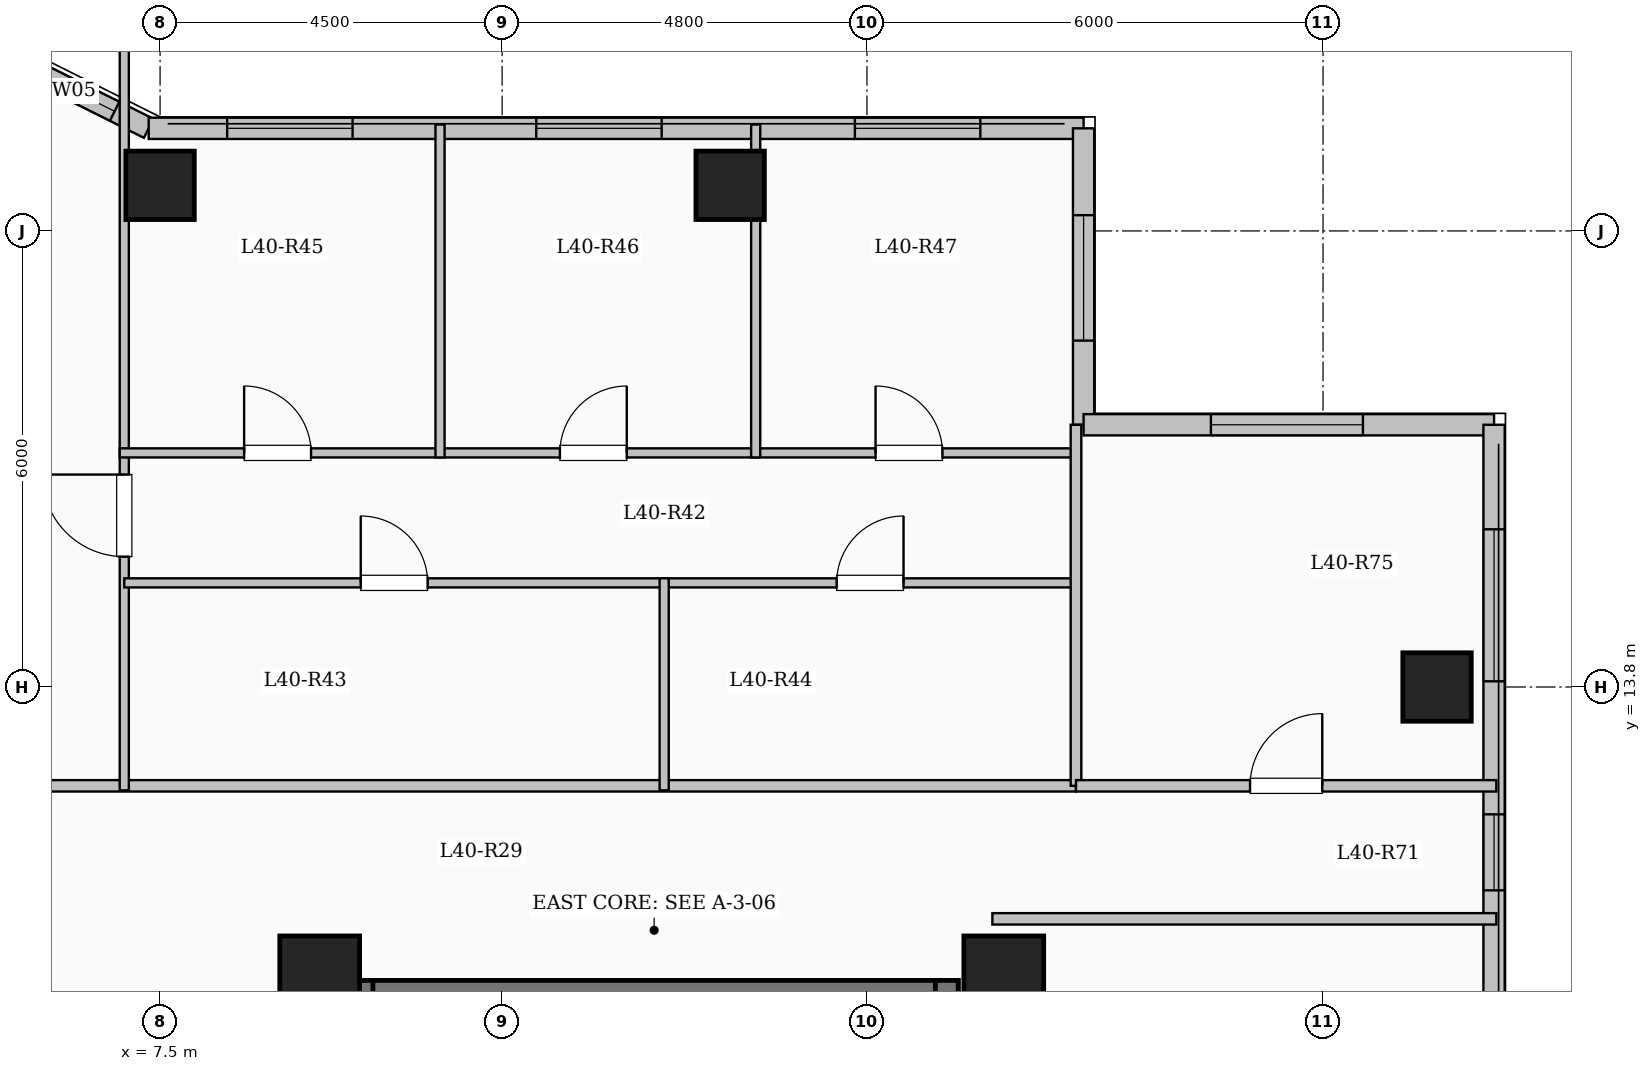
"""IFC4 building model, lengths in metres.
Left out: names, types, materials, properties, quantities, classifications, styles, units other than length and angle.
Written with IfcOpenShell. Run it as: python <this file> out.ifc"""

import sys

from ifc_helpers import new_model, si_unit, direction, frame, frame_2d, origin, origin_2d, place, context, subcontext, project, spatial, rectangle, extrude, element, fill, save


model = new_model("IFC4")
c1 = context("Model", 3, precision=1e-05, world=origin(), true_north=direction((0.0, 1.0)))
c2 = subcontext(c1, "Body", "Model", "MODEL_VIEW")
j1 = project(units=[si_unit("LENGTHUNIT", "METRE"), si_unit("PLANEANGLEUNIT", "RADIAN")], contexts=[c1])
p1 = place(None, origin())
s1 = spatial("IfcSite", under=j1, at=p1, CompositionType="ELEMENT")
p2 = place(p1, origin())
s2 = spatial("IfcBuilding", under=s1, at=p2, CompositionType="ELEMENT")
p3 = place(p2, frame((0.0, 0.0, 149.35)))
s3 = spatial("IfcBuildingStorey", under=s2, at=p3, CompositionType="ELEMENT", Elevation=149.35)
for number, where, z_axis, x_axis in (
    (1, (9.6, 10.0, 0.0), (0.0, 0.0, 1.0), (1.0, 0.0, 0.0)),
    (2, (18.6, 10.0, 0.0), (0.0, 0.0, 1.0), (1.0, 0.0, 0.0)),
):
    element("IfcColumn", number, at=place(p3, frame(where, z_axis=z_axis, x_axis=x_axis)), inside=s3, PredefinedType="COLUMN", context=c2, shape_type="SweptSolid", body=[
        extrude(rectangle(XDim=1.05, YDim=1.05, at=origin_2d()), origin(), (0.0, 0.0, 1.0), 3.35),
    ])
for number, where, z_axis, x_axis in (
    (3, (7.5, 20.4, 0.0), (0.0, 0.0, 1.0), (1.0, 0.0, 0.0)),
    (4, (15.0, 20.4, 0.0), (0.0, 0.0, 1.0), (1.0, 0.0, 0.0)),
    (5, (24.3, 13.8, 0.0), (0.0, 0.0, 1.0), (1.0, 0.0, 0.0)),
):
    element("IfcColumn", number, at=place(p3, frame(where, z_axis=z_axis, x_axis=x_axis)), inside=s3, PredefinedType="COLUMN", context=c2, shape_type="SweptSolid", body=[
        extrude(rectangle(XDim=0.9, YDim=0.9, at=origin_2d()), origin(), (0.0, 0.0, 1.0), 3.35),
    ])
p4 = place(p3, frame((4.35, 22.65, 0.0), z_axis=(0.0, 0.0, 1.0), x_axis=(0.894427191, -0.4472135955, 0.0)))
e6 = element("IfcWall", 6, at=p4, inside=s3, PredefinedType="SOLIDWALL", context=c2, shape_type="SweptSolid", body=[
    extrude(rectangle(XDim=3.354, YDim=0.28, at=frame_2d((1.677, 0.0))), origin(), (0.0, 0.0, 1.0), 3.1),
])
p5 = place(p4, frame((1.653, 0.0, 0.95)))
e7 = element("IfcOpeningElement", 7, at=p5, cuts=e6, PredefinedType="OPENING", context=c2, shape_type="SweptSolid", body=[
    extrude(rectangle(XDim=1.2, YDim=1.5, at=frame_2d((0.6, 0.75))), frame((0.0, 0.15, 0.0), z_axis=(0.0, -1.0, 0.0), x_axis=(1.0, 0.0, 0.0)), (0.0, 0.0, 1.0), 0.3),
])
p6 = place(p3, frame((7.35, 21.15, 0.0), z_axis=(0.0, 0.0, 1.0), x_axis=(1.0, 0.0, 0.0)))
e8 = element("IfcWall", 8, at=p6, inside=s3, PredefinedType="SOLIDWALL", context=c2, shape_type="SweptSolid", body=[
    extrude(rectangle(XDim=12.3, YDim=0.28, at=frame_2d((6.15, 0.0))), origin(), (0.0, 0.0, 1.0), 3.1),
])
p7 = place(p6, frame((1.033, 0.0, 0.9)))
e9 = element("IfcOpeningElement", 9, at=p7, cuts=e8, PredefinedType="OPENING", context=c2, shape_type="SweptSolid", body=[
    extrude(rectangle(XDim=1.65, YDim=1.6, at=frame_2d((0.825, 0.8))), frame((0.0, 0.15, 0.0), z_axis=(0.0, -1.0, 0.0), x_axis=(1.0, 0.0, 0.0)), (0.0, 0.0, 1.0), 0.3),
])
p8 = place(p6, frame((5.099, 0.0, 0.9)))
e10 = element("IfcOpeningElement", 10, at=p8, cuts=e8, PredefinedType="OPENING", context=c2, shape_type="SweptSolid", body=[
    extrude(rectangle(XDim=1.65, YDim=1.6, at=frame_2d((0.825, 0.8))), frame((0.0, 0.15, 0.0), z_axis=(0.0, -1.0, 0.0), x_axis=(1.0, 0.0, 0.0)), (0.0, 0.0, 1.0), 0.3),
])
p9 = place(p6, frame((9.291, 0.0, 0.9)))
e11 = element("IfcOpeningElement", 11, at=p9, cuts=e8, PredefinedType="OPENING", context=c2, shape_type="SweptSolid", body=[
    extrude(rectangle(XDim=1.65, YDim=1.6, at=frame_2d((0.825, 0.8))), frame((0.0, 0.15, 0.0), z_axis=(0.0, -1.0, 0.0), x_axis=(1.0, 0.0, 0.0)), (0.0, 0.0, 1.0), 0.3),
])
p10 = place(p3, frame((19.65, 21.15, 0.0), z_axis=(0.0, 0.0, 1.0), x_axis=(0.0, -1.0, 0.0)))
e12 = element("IfcWall", 12, at=p10, inside=s3, PredefinedType="SOLIDWALL", context=c2, shape_type="SweptSolid", body=[
    extrude(rectangle(XDim=3.9, YDim=0.28, at=frame_2d((1.95, 0.0))), origin(), (0.0, 0.0, 1.0), 3.1),
])
p11 = place(p10, frame((1.143, 0.0, 0.9)))
e13 = element("IfcOpeningElement", 13, at=p11, cuts=e12, PredefinedType="OPENING", context=c2, shape_type="SweptSolid", body=[
    extrude(rectangle(XDim=1.65, YDim=1.6, at=frame_2d((0.825, 0.8))), frame((0.0, 0.15, 0.0), z_axis=(0.0, -1.0, 0.0), x_axis=(1.0, 0.0, 0.0)), (0.0, 0.0, 1.0), 0.3),
])
p12 = place(p3, frame((19.65, 17.25, 0.0), z_axis=(0.0, 0.0, 1.0), x_axis=(1.0, 0.0, 0.0)))
e14 = element("IfcWall", 14, at=p12, inside=s3, PredefinedType="SOLIDWALL", context=c2, shape_type="SweptSolid", body=[
    extrude(rectangle(XDim=5.4, YDim=0.28, at=frame_2d((2.7, 0.0))), origin(), (0.0, 0.0, 1.0), 3.1),
])
p13 = place(p12, frame((1.675, 0.0, 0.9)))
e15 = element("IfcOpeningElement", 15, at=p13, cuts=e14, PredefinedType="OPENING", context=c2, shape_type="SweptSolid", body=[
    extrude(rectangle(XDim=2.0, YDim=1.7, at=frame_2d((1.0, 0.85))), frame((0.0, 0.15, 0.0), z_axis=(0.0, -1.0, 0.0), x_axis=(1.0, 0.0, 0.0)), (0.0, 0.0, 1.0), 0.3),
])
p14 = place(p3, frame((25.05, 17.25, 0.0), z_axis=(0.0, 0.0, 1.0), x_axis=(0.0, -1.0, 0.0)))
e16 = element("IfcWall", 16, at=p14, inside=s3, PredefinedType="SOLIDWALL", context=c2, shape_type="SweptSolid", body=[
    extrude(rectangle(XDim=34.5, YDim=0.28, at=frame_2d((17.25, 0.0))), origin(), (0.0, 0.0, 1.0), 3.1),
])
p15 = place(p14, frame((1.375, 0.0, 0.9)))
e17 = element("IfcOpeningElement", 17, at=p15, cuts=e16, PredefinedType="OPENING", context=c2, shape_type="SweptSolid", body=[
    extrude(rectangle(XDim=2.0, YDim=1.7, at=frame_2d((1.0, 0.85))), frame((0.0, 0.15, 0.0), z_axis=(0.0, -1.0, 0.0), x_axis=(1.0, 0.0, 0.0)), (0.0, 0.0, 1.0), 0.3),
])
p16 = place(p14, frame((5.125, 0.0, 0.95)))
e18 = element("IfcOpeningElement", 18, at=p16, cuts=e16, PredefinedType="OPENING", context=c2, shape_type="SweptSolid", body=[
    extrude(rectangle(XDim=1.0, YDim=1.5, at=frame_2d((0.5, 0.75))), frame((0.0, 0.15, 0.0), z_axis=(0.0, -1.0, 0.0), x_axis=(1.0, 0.0, 0.0)), (0.0, 0.0, 1.0), 0.3),
])
p17 = place(p14, frame((14.5, 0.0, 0.9)))
e19 = element("IfcOpeningElement", 19, at=p17, cuts=e16, PredefinedType="OPENING", context=c2, shape_type="SweptSolid", body=[
    extrude(rectangle(XDim=2.0, YDim=1.7, at=frame_2d((1.0, 0.85))), frame((0.0, 0.15, 0.0), z_axis=(0.0, -1.0, 0.0), x_axis=(1.0, 0.0, 0.0)), (0.0, 0.0, 1.0), 0.3),
])
p18 = place(p14, frame((25.258, 0.0, 0.9)))
e20 = element("IfcOpeningElement", 20, at=p18, cuts=e16, PredefinedType="OPENING", context=c2, shape_type="SweptSolid", body=[
    extrude(rectangle(XDim=1.5, YDim=1.65, at=frame_2d((0.75, 0.825))), frame((0.0, 0.15, 0.0), z_axis=(0.0, -1.0, 0.0), x_axis=(1.0, 0.0, 0.0)), (0.0, 0.0, 1.0), 0.3),
])
p19 = place(p14, frame((29.95, 0.0, 0.9)))
e21 = element("IfcOpeningElement", 21, at=p19, cuts=e16, PredefinedType="OPENING", context=c2, shape_type="SweptSolid", body=[
    extrude(rectangle(XDim=2.2, YDim=1.75, at=frame_2d((1.1, 0.875))), frame((0.0, 0.15, 0.0), z_axis=(0.0, -1.0, 0.0), x_axis=(1.0, 0.0, 0.0)), (0.0, 0.0, 1.0), 0.3),
])
p20 = place(p3, frame((10.0, 9.79, 0.0), z_axis=(0.0, 0.0, 1.0), x_axis=(1.0, 0.0, 0.0)))
e22 = element("IfcWall", 22, at=p20, inside=s3, PredefinedType="SHEAR", context=c2, shape_type="SweptSolid", body=[
    extrude(rectangle(XDim=8.0, YDim=0.3, at=frame_2d((4.0, 0.0))), origin(), (0.0, 0.0, 1.0), 3.35),
])
for number, where, z_axis, x_axis in (
    (23, (10.15, 6.35, 0.0), (0.0, 0.0, 1.0), (0.0, 1.0, 0.0)),
    (24, (17.85, 6.35, 0.0), (0.0, 0.0, 1.0), (0.0, 1.0, 0.0)),
):
    element("IfcWall", number, at=place(p3, frame(where, z_axis=z_axis, x_axis=x_axis)), inside=s3, PredefinedType="SHEAR", context=c2, shape_type="SweptSolid", body=[
        extrude(rectangle(XDim=3.59, YDim=0.3, at=frame_2d((1.795, 0.0))), origin(), (0.0, 0.0, 1.0), 3.35),
    ])
p21 = place(p3, frame((3.85, 12.5, 0.0), z_axis=(0.0, 0.0, 1.0), x_axis=(1.0, 0.0, 0.0)))
e25 = element("IfcWall", 25, at=p21, inside=s3, PredefinedType="PARTITIONING", context=c2, shape_type="SweptSolid", body=[
    extrude(rectangle(XDim=15.7, YDim=0.15, at=frame_2d((7.85, 0.0))), origin(), (0.0, 0.0, 1.0), 3.1),
])
p22 = place(p21, frame((0.7, 0.0, 0.0)))
e26 = element("IfcOpeningElement", 26, at=p22, cuts=e25, PredefinedType="OPENING", context=c2, shape_type="SweptSolid", body=[
    extrude(rectangle(XDim=0.96, YDim=2.15, at=frame_2d((0.48, 1.075))), frame((0.0, 0.085, 0.0), z_axis=(0.0, -1.0, 0.0), x_axis=(1.0, 0.0, 0.0)), (0.0, 0.0, 1.0), 0.17),
])
p23 = place(p3, frame((7.029, 12.44, 0.0), z_axis=(0.0, 0.0, 1.0), x_axis=(0.0, 1.0, 0.0)))
e27 = element("IfcWall", 27, at=p23, inside=s3, PredefinedType="PARTITIONING", context=c2, shape_type="SweptSolid", body=[
    extrude(rectangle(XDim=9.74, YDim=0.12, at=frame_2d((4.87, 0.0))), origin(), (0.0, 0.0, 1.0), 3.1),
])
p24 = place(p23, frame((3.075, 0.0, 0.0)))
e28 = element("IfcOpeningElement", 28, at=p24, cuts=e27, PredefinedType="OPENING", context=c2, shape_type="SweptSolid", body=[
    extrude(rectangle(XDim=1.08, YDim=2.15, at=frame_2d((0.54, 1.075))), frame((0.0, 0.07, 0.0), z_axis=(0.0, -1.0, 0.0), x_axis=(1.0, 0.0, 0.0)), (0.0, 0.0, 1.0), 0.14),
])
p25 = place(p3, frame((7.029, 15.17, 0.0), z_axis=(0.0, 0.0, 1.0), x_axis=(1.0, 0.0, 0.0)))
e29 = element("IfcWall", 29, at=p25, inside=s3, PredefinedType="PARTITIONING", context=c2, shape_type="SweptSolid", body=[
    extrude(rectangle(XDim=7.103, YDim=0.12, at=frame_2d((3.552, 0.0))), origin(), (0.0, 0.0, 1.0), 3.1),
])
p26 = place(p25, frame((3.111, 0.0, 0.0)))
e30 = element("IfcOpeningElement", 30, at=p26, cuts=e29, PredefinedType="OPENING", context=c2, shape_type="SweptSolid", body=[
    extrude(rectangle(XDim=0.88, YDim=2.1, at=frame_2d((0.44, 1.05))), frame((0.0, 0.07, 0.0), z_axis=(0.0, -1.0, 0.0), x_axis=(1.0, 0.0, 0.0)), (0.0, 0.0, 1.0), 0.14),
])
p27 = place(p3, frame((14.132, 15.17, 0.0), z_axis=(0.0, 0.0, 1.0), x_axis=(1.0, 0.0, 0.0)))
e31 = element("IfcWall", 31, at=p27, inside=s3, PredefinedType="PARTITIONING", context=c2, shape_type="SweptSolid", body=[
    extrude(rectangle(XDim=5.418, YDim=0.12, at=frame_2d((2.709, 0.0))), origin(), (0.0, 0.0, 1.0), 3.1),
])
p28 = place(p27, frame((2.269, 0.0, 0.0)))
e32 = element("IfcOpeningElement", 32, at=p28, cuts=e31, PredefinedType="OPENING", context=c2, shape_type="SweptSolid", body=[
    extrude(rectangle(XDim=0.88, YDim=2.1, at=frame_2d((0.44, 1.05))), frame((0.0, 0.07, 0.0), z_axis=(0.0, -1.0, 0.0), x_axis=(1.0, 0.0, 0.0)), (0.0, 0.0, 1.0), 0.14),
])
p29 = place(p3, frame((6.969, 16.88, 0.0), z_axis=(0.0, 0.0, 1.0), x_axis=(1.0, 0.0, 0.0)))
e33 = element("IfcWall", 33, at=p29, inside=s3, PredefinedType="PARTITIONING", context=c2, shape_type="SweptSolid", body=[
    extrude(rectangle(XDim=12.641, YDim=0.12, at=frame_2d((6.321, 0.0))), origin(), (0.0, 0.0, 1.0), 2.685),
])
p30 = place(p29, frame((1.637, 0.0, 0.0)))
e34 = element("IfcOpeningElement", 34, at=p30, cuts=e33, PredefinedType="OPENING", context=c2, shape_type="SweptSolid", body=[
    extrude(rectangle(XDim=0.88, YDim=2.1, at=frame_2d((0.44, 1.05))), frame((0.0, 0.07, 0.0), z_axis=(0.0, -1.0, 0.0), x_axis=(1.0, 0.0, 0.0)), (0.0, 0.0, 1.0), 0.14),
])
p31 = place(p29, frame((5.791, 0.0, 0.0)))
e35 = element("IfcOpeningElement", 35, at=p31, cuts=e33, PredefinedType="OPENING", context=c2, shape_type="SweptSolid", body=[
    extrude(rectangle(XDim=0.88, YDim=2.1, at=frame_2d((0.44, 1.05))), frame((0.0, 0.07, 0.0), z_axis=(0.0, -1.0, 0.0), x_axis=(1.0, 0.0, 0.0)), (0.0, 0.0, 1.0), 0.14),
])
p32 = place(p29, frame((9.944, 0.0, 0.0)))
e36 = element("IfcOpeningElement", 36, at=p32, cuts=e33, PredefinedType="OPENING", context=c2, shape_type="SweptSolid", body=[
    extrude(rectangle(XDim=0.88, YDim=2.1, at=frame_2d((0.44, 1.05))), frame((0.0, 0.07, 0.0), z_axis=(0.0, -1.0, 0.0), x_axis=(1.0, 0.0, 0.0)), (0.0, 0.0, 1.0), 0.14),
])
p33 = place(p3, frame((14.132, 12.44, 0.0), z_axis=(0.0, 0.0, 1.0), x_axis=(0.0, 1.0, 0.0)))
e37 = element("IfcWall", 37, at=p33, inside=s3, PredefinedType="PARTITIONING", context=c2, shape_type="SweptSolid", body=[
    extrude(rectangle(XDim=2.79, YDim=0.12, at=frame_2d((1.395, 0.0))), origin(), (0.0, 0.0, 1.0), 3.1),
])
for number, where, z_axis, x_axis in (
    (38, (11.183, 16.82, 0.0), (0.0, 0.0, 1.0), (0.0, 1.0, 0.0)),
    (39, (15.336, 16.82, 0.0), (0.0, 0.0, 1.0), (0.0, 1.0, 0.0)),
):
    element("IfcWall", number, at=place(p3, frame(where, z_axis=z_axis, x_axis=x_axis)), inside=s3, PredefinedType="PARTITIONING", context=c2, shape_type="SweptSolid", body=[
        extrude(rectangle(XDim=4.38, YDim=0.12, at=frame_2d((2.19, 0.0))), origin(), (0.0, 0.0, 1.0), 3.1),
    ])
p34 = place(p3, frame((18.45, 10.75, 0.0), z_axis=(0.0, 0.0, 1.0), x_axis=(1.0, 0.0, 0.0)))
e40 = element("IfcWall", 40, at=p34, inside=s3, PredefinedType="PARTITIONING", context=c2, shape_type="SweptSolid", body=[
    extrude(rectangle(XDim=6.63, YDim=0.15, at=frame_2d((3.315, 0.0))), origin(), (0.0, 0.0, 1.0), 3.1),
])
p35 = place(p3, frame((19.55, 12.5, 0.0), z_axis=(0.0, 0.0, 1.0), x_axis=(0.0, 1.0, 0.0)))
e41 = element("IfcWall", 41, at=p35, inside=s3, PredefinedType="PARTITIONING", context=c2, shape_type="SweptSolid", body=[
    extrude(rectangle(XDim=4.75, YDim=0.14, at=frame_2d((2.375, 0.0))), origin(), (0.0, 0.0, 1.0), 3.1),
])
p36 = place(p3, frame((19.55, 12.5, 0.0), z_axis=(0.0, 0.0, 1.0), x_axis=(1.0, 0.0, 0.0)))
e42 = element("IfcWall", 42, at=p36, inside=s3, PredefinedType="PARTITIONING", context=c2, shape_type="SweptSolid", body=[
    extrude(rectangle(XDim=5.53, YDim=0.15, at=frame_2d((2.765, 0.0))), origin(), (0.0, 0.0, 1.0), 3.1),
])
p37 = place(p36, frame((2.29, 0.0, 0.0)))
e43 = element("IfcOpeningElement", 43, at=p37, cuts=e42, PredefinedType="OPENING", context=c2, shape_type="SweptSolid", body=[
    extrude(rectangle(XDim=0.95, YDim=2.15, at=frame_2d((0.475, 1.075))), frame((0.0, 0.085, 0.0), z_axis=(0.0, -1.0, 0.0), x_axis=(1.0, 0.0, 0.0)), (0.0, 0.0, 1.0), 0.17),
])
p38 = place(p5, origin())
e44 = element("IfcWindow", 44, at=p38, inside=s3, PartitioningType="SINGLE_PANEL", PredefinedType="WINDOW", context=c2, shape_type="SweptSolid", body=[
    extrude(rectangle(XDim=1.2, YDim=1.5, at=frame_2d((0.6, 0.75))), frame((0.0, 0.03, 0.0), z_axis=(0.0, -1.0, 0.0), x_axis=(1.0, 0.0, 0.0)), (0.0, 0.0, 1.0), 0.06),
])
fill(e7, e44)
p39 = place(p7, origin())
e45 = element("IfcWindow", 45, at=p39, inside=s3, PartitioningType="SINGLE_PANEL", PredefinedType="WINDOW", context=c2, shape_type="SweptSolid", body=[
    extrude(rectangle(XDim=1.65, YDim=1.6, at=frame_2d((0.825, 0.8))), frame((0.0, 0.03, 0.0), z_axis=(0.0, -1.0, 0.0), x_axis=(1.0, 0.0, 0.0)), (0.0, 0.0, 1.0), 0.06),
])
fill(e9, e45)
p40 = place(p8, origin())
e46 = element("IfcWindow", 46, at=p40, inside=s3, PartitioningType="SINGLE_PANEL", PredefinedType="WINDOW", context=c2, shape_type="SweptSolid", body=[
    extrude(rectangle(XDim=1.65, YDim=1.6, at=frame_2d((0.825, 0.8))), frame((0.0, 0.03, 0.0), z_axis=(0.0, -1.0, 0.0), x_axis=(1.0, 0.0, 0.0)), (0.0, 0.0, 1.0), 0.06),
])
fill(e10, e46)
p41 = place(p9, origin())
e47 = element("IfcWindow", 47, at=p41, inside=s3, PartitioningType="SINGLE_PANEL", PredefinedType="WINDOW", context=c2, shape_type="SweptSolid", body=[
    extrude(rectangle(XDim=1.65, YDim=1.6, at=frame_2d((0.825, 0.8))), frame((0.0, 0.03, 0.0), z_axis=(0.0, -1.0, 0.0), x_axis=(1.0, 0.0, 0.0)), (0.0, 0.0, 1.0), 0.06),
])
fill(e11, e47)
p42 = place(p11, origin())
e48 = element("IfcWindow", 48, at=p42, inside=s3, PartitioningType="SINGLE_PANEL", PredefinedType="WINDOW", context=c2, shape_type="SweptSolid", body=[
    extrude(rectangle(XDim=1.65, YDim=1.6, at=frame_2d((0.825, 0.8))), frame((0.0, 0.03, 0.0), z_axis=(0.0, -1.0, 0.0), x_axis=(1.0, 0.0, 0.0)), (0.0, 0.0, 1.0), 0.06),
])
fill(e13, e48)
p43 = place(p13, origin())
e49 = element("IfcWindow", 49, at=p43, inside=s3, PartitioningType="SINGLE_PANEL", PredefinedType="WINDOW", context=c2, shape_type="SweptSolid", body=[
    extrude(rectangle(XDim=2.0, YDim=1.7, at=frame_2d((1.0, 0.85))), frame((0.0, 0.03, 0.0), z_axis=(0.0, -1.0, 0.0), x_axis=(1.0, 0.0, 0.0)), (0.0, 0.0, 1.0), 0.06),
])
fill(e15, e49)
p44 = place(p15, origin())
e50 = element("IfcWindow", 50, at=p44, inside=s3, PartitioningType="SINGLE_PANEL", PredefinedType="WINDOW", context=c2, shape_type="SweptSolid", body=[
    extrude(rectangle(XDim=2.0, YDim=1.7, at=frame_2d((1.0, 0.85))), frame((0.0, 0.03, 0.0), z_axis=(0.0, -1.0, 0.0), x_axis=(1.0, 0.0, 0.0)), (0.0, 0.0, 1.0), 0.06),
])
fill(e17, e50)
p45 = place(p16, origin())
e51 = element("IfcWindow", 51, at=p45, inside=s3, PartitioningType="SINGLE_PANEL", PredefinedType="WINDOW", context=c2, shape_type="SweptSolid", body=[
    extrude(rectangle(XDim=1.0, YDim=1.5, at=frame_2d((0.5, 0.75))), frame((0.0, 0.03, 0.0), z_axis=(0.0, -1.0, 0.0), x_axis=(1.0, 0.0, 0.0)), (0.0, 0.0, 1.0), 0.06),
])
fill(e18, e51)
p46 = place(p24, origin())
e52 = element("IfcDoor", 52, at=p46, inside=s3, OperationType="SINGLE_SWING_RIGHT", PredefinedType="DOOR", context=c2, shape_type="SweptSolid", body=[
    extrude(rectangle(XDim=1.08, YDim=2.15, at=frame_2d((0.54, 1.075))), frame((0.0, 0.025, 0.0), z_axis=(0.0, -1.0, 0.0), x_axis=(1.0, 0.0, 0.0)), (0.0, 0.0, 1.0), 0.05),
])
fill(e28, e52)
p47 = place(p26, origin())
e53 = element("IfcDoor", 53, at=p47, inside=s3, OperationType="SINGLE_SWING_LEFT", PredefinedType="DOOR", context=c2, shape_type="SweptSolid", body=[
    extrude(rectangle(XDim=0.88, YDim=2.1, at=frame_2d((0.44, 1.05))), frame((0.0, 0.025, 0.0), z_axis=(0.0, -1.0, 0.0), x_axis=(1.0, 0.0, 0.0)), (0.0, 0.0, 1.0), 0.05),
])
fill(e30, e53)
p48 = place(p28, origin())
e54 = element("IfcDoor", 54, at=p48, inside=s3, OperationType="SINGLE_SWING_RIGHT", PredefinedType="DOOR", context=c2, shape_type="SweptSolid", body=[
    extrude(rectangle(XDim=0.88, YDim=2.1, at=frame_2d((0.44, 1.05))), frame((0.0, 0.025, 0.0), z_axis=(0.0, -1.0, 0.0), x_axis=(1.0, 0.0, 0.0)), (0.0, 0.0, 1.0), 0.05),
])
fill(e32, e54)
p49 = place(p30, origin())
e55 = element("IfcDoor", 55, at=p49, inside=s3, OperationType="SINGLE_SWING_LEFT", PredefinedType="DOOR", context=c2, shape_type="SweptSolid", body=[
    extrude(rectangle(XDim=0.88, YDim=2.1, at=frame_2d((0.44, 1.05))), frame((0.0, 0.025, 0.0), z_axis=(0.0, -1.0, 0.0), x_axis=(1.0, 0.0, 0.0)), (0.0, 0.0, 1.0), 0.05),
])
fill(e34, e55)
p50 = place(p31, origin())
e56 = element("IfcDoor", 56, at=p50, inside=s3, OperationType="SINGLE_SWING_RIGHT", PredefinedType="DOOR", context=c2, shape_type="SweptSolid", body=[
    extrude(rectangle(XDim=0.88, YDim=2.1, at=frame_2d((0.44, 1.05))), frame((0.0, 0.025, 0.0), z_axis=(0.0, -1.0, 0.0), x_axis=(1.0, 0.0, 0.0)), (0.0, 0.0, 1.0), 0.05),
])
fill(e35, e56)
p51 = place(p32, origin())
e57 = element("IfcDoor", 57, at=p51, inside=s3, OperationType="SINGLE_SWING_LEFT", PredefinedType="DOOR", context=c2, shape_type="SweptSolid", body=[
    extrude(rectangle(XDim=0.88, YDim=2.1, at=frame_2d((0.44, 1.05))), frame((0.0, 0.025, 0.0), z_axis=(0.0, -1.0, 0.0), x_axis=(1.0, 0.0, 0.0)), (0.0, 0.0, 1.0), 0.05),
])
fill(e36, e57)
p52 = place(p37, origin())
e58 = element("IfcDoor", 58, at=p52, inside=s3, OperationType="SINGLE_SWING_RIGHT", PredefinedType="DOOR", context=c2, shape_type="SweptSolid", body=[
    extrude(rectangle(XDim=0.95, YDim=2.15, at=frame_2d((0.475, 1.075))), frame((0.0, 0.025, 0.0), z_axis=(0.0, -1.0, 0.0), x_axis=(1.0, 0.0, 0.0)), (0.0, 0.0, 1.0), 0.05),
])
fill(e43, e58)
save(model, sys.argv[1])
